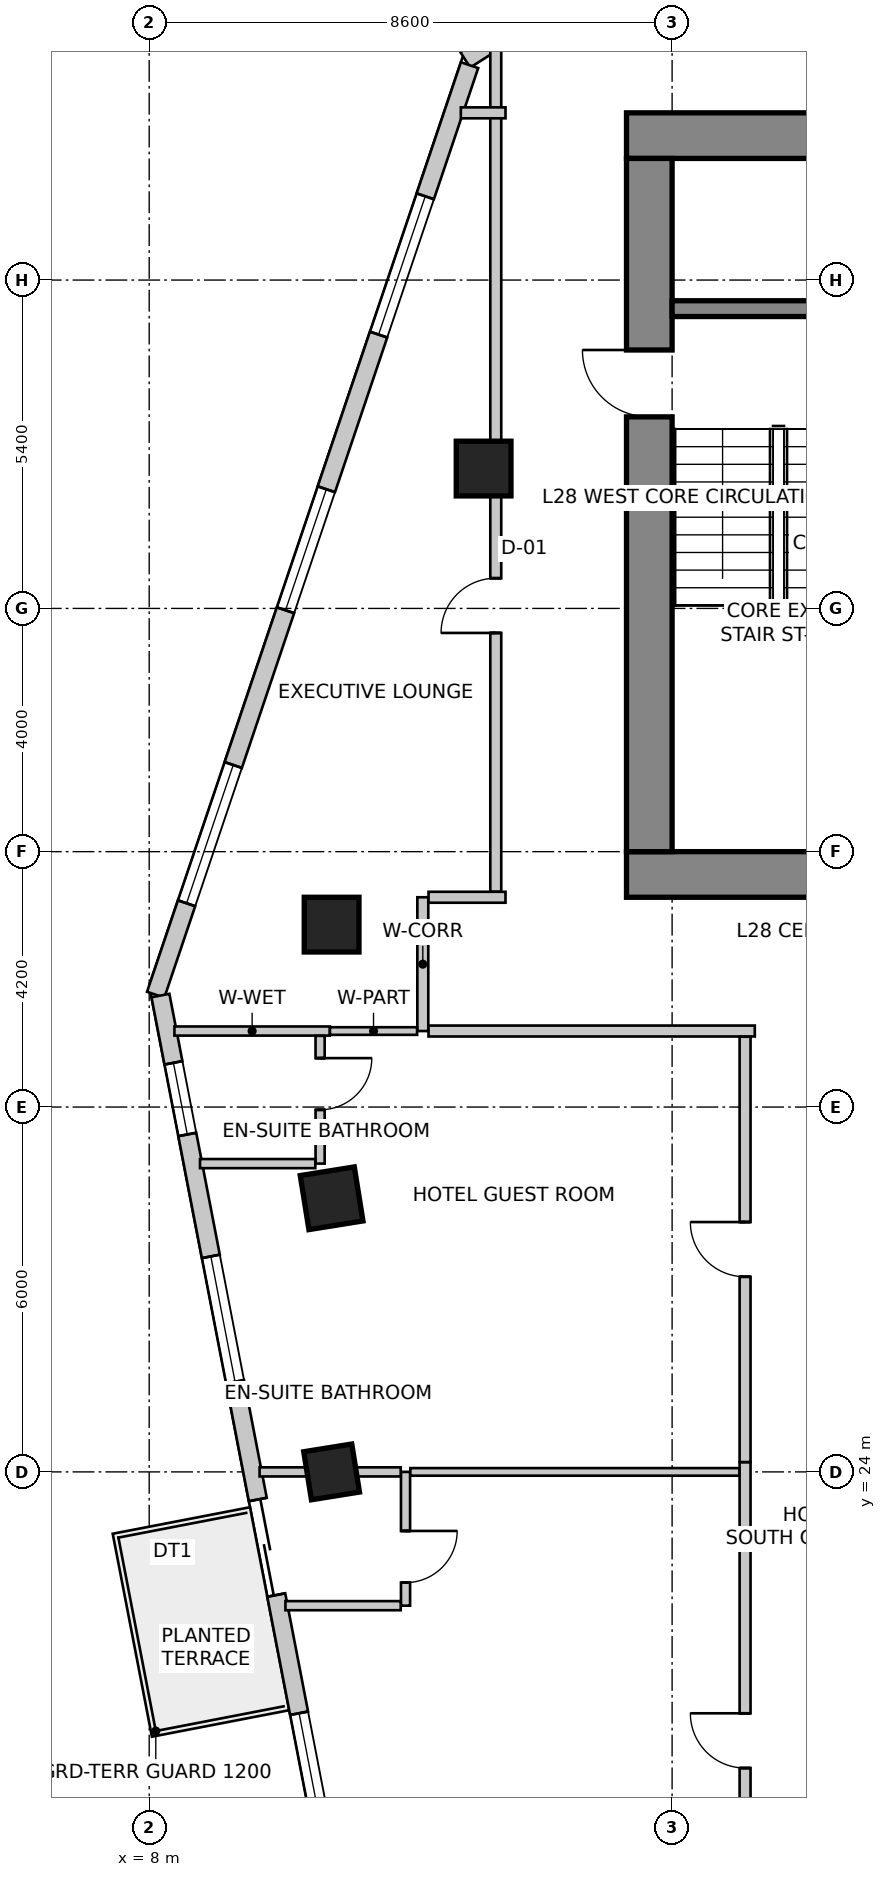
"""IFC4 building model, lengths in metres.
Left out: names, types, materials, properties, quantities, classifications, styles, units other than length and angle.
Written with IfcOpenShell. Run it as: python <this file> out.ifc"""

import sys

from ifc_helpers import new_model, si_unit, direction, frame, frame_2d, origin, origin_2d, place, context, subcontext, project, spatial, rectangle, extrude, source, transform, mapped, element, fill, save


model = new_model("IFC4")
c1 = context("Model", 3, precision=1e-05, world=origin(), true_north=direction((0.0, 1.0)))
c2 = subcontext(c1, "Body", "Model", "MODEL_VIEW")
j1 = project(units=[si_unit("LENGTHUNIT", "METRE"), si_unit("PLANEANGLEUNIT", "RADIAN")], contexts=[c1])
p1 = place(None, origin())
s1 = spatial("IfcSite", under=j1, at=p1, CompositionType="ELEMENT")
p2 = place(p1, origin())
s2 = spatial("IfcBuilding", under=s1, at=p2, CompositionType="ELEMENT")
p3 = place(p2, frame((0.0, 0.0, 117.8)))
s3 = spatial("IfcBuildingStorey", under=s2, at=p3, CompositionType="ELEMENT", Elevation=117.8)
p4 = place(p3, frame((15.85, 45.975, 0.0), z_axis=(0.0, 0.0, 1.0), x_axis=(1.0, 0.0, 0.0)))
e1 = element("IfcWall", 1, at=p4, inside=s3, PredefinedType="SHEAR", context=c2, shape_type="SweptSolid", body=[
    extrude(rectangle(XDim=15.9, YDim=0.75, at=frame_2d((7.95, 0.0))), origin(), (0.0, 0.0, 1.0), 3.6),
])
p5 = place(p3, frame((15.85, 33.825, 0.0), z_axis=(0.0, 0.0, 1.0), x_axis=(1.0, 0.0, 0.0)))
e2 = element("IfcWall", 2, at=p5, inside=s3, PredefinedType="SHEAR", context=c2, shape_type="SweptSolid", body=[
    extrude(rectangle(XDim=15.9, YDim=0.75, at=frame_2d((7.95, 0.0))), origin(), (0.0, 0.0, 1.0), 3.6),
])
m1 = source(origin(), c2, "Body", "SweptSolid", [
    extrude(rectangle(XDim=1.3, YDim=2.15, at=frame_2d((0.65, 1.075))), frame((0.0, 0.385, 0.0), z_axis=(0.0, -1.0, 0.0), x_axis=(1.0, 0.0, 0.0)), (0.0, 0.0, 1.0), 0.77),
])
p6 = place(p5, frame((10.08, 0.0, 0.0)))
e3 = element("IfcOpeningElement", 3, at=p6, cuts=e2, PredefinedType="OPENING", context=c2, shape_type="MappedRepresentation", body=[
    mapped(m1, transform((0.0, 0.0, 0.0), scale=1.0)),
])
p7 = place(p3, frame((16.225, 34.2, 0.0), z_axis=(0.0, 0.0, 1.0), x_axis=(0.0, 1.0, 0.0)))
e4 = element("IfcWall", 4, at=p7, inside=s3, PredefinedType="SHEAR", context=c2, shape_type="SweptSolid", body=[
    extrude(rectangle(XDim=11.4, YDim=0.75, at=frame_2d((5.7, 0.0))), origin(), (0.0, 0.0, 1.0), 3.6),
])
m2 = source(origin(), c2, "Body", "SweptSolid", [
    extrude(rectangle(XDim=1.1, YDim=2.15, at=frame_2d((0.55, 1.075))), frame((0.0, 0.385, 0.0), z_axis=(0.0, -1.0, 0.0), x_axis=(1.0, 0.0, 0.0)), (0.0, 0.0, 1.0), 0.77),
])
p8 = place(p7, frame((7.15, 0.0, 0.0)))
e5 = element("IfcOpeningElement", 5, at=p8, cuts=e4, PredefinedType="OPENING", context=c2, shape_type="MappedRepresentation", body=[
    mapped(m2, transform((0.0, 0.0, 0.0), scale=1.0)),
])
p9 = place(p3, frame((16.6, 43.13, 0.0), z_axis=(0.0, 0.0, 1.0), x_axis=(1.0, 0.0, 0.0)))
e6 = element("IfcWall", 6, at=p9, inside=s3, PredefinedType="SHEAR", context=c2, shape_type="SweptSolid", body=[
    extrude(rectangle(XDim=3.5, YDim=0.26, at=frame_2d((1.75, 0.0))), origin(), (0.0, 0.0, 1.0), 3.6),
])
m3 = source(origin(), c2, "Body", "SweptSolid", [
    extrude(rectangle(XDim=0.9, YDim=0.9, at=origin_2d()), origin(), (0.0, 0.0, 1.0), 3.6),
])
for number, where, z_axis, x_axis in (
    (7, (11.0, 33.0, 0.0), (0.0, 0.0, 1.0), (1.0, 0.0, 0.0)),
    (8, (13.5, 40.5, 0.0), (0.0, 0.0, 1.0), (1.0, 0.0, 0.0)),
    (9, (11.0, 28.5, 0.0), (0.0, 0.0, 1.0), (0.158, -0.987, 0.0)),
):
    element("IfcColumn", number, at=place(p3, frame(where, z_axis=z_axis, x_axis=x_axis)), inside=s3, PredefinedType="COLUMN", context=c2, shape_type="MappedRepresentation", body=[
        mapped(m3, transform((0.0, 0.0, 0.0), scale=1.0)),
    ])
m4 = source(origin(), c2, "Body", "SweptSolid", [
    extrude(rectangle(XDim=0.8, YDim=0.8, at=origin_2d()), origin(), (0.0, 0.0, 1.0), 3.6),
])
p10 = place(p3, frame((11.0, 24.0, 0.0), z_axis=(0.0, 0.0, 1.0), x_axis=(0.158158067254, -0.987413806751, 0.0)))
e10 = element("IfcColumn", 10, at=p10, inside=s3, PredefinedType="COLUMN", context=c2, shape_type="MappedRepresentation", body=[
    mapped(m4, transform((0.0, 0.0, 0.0), scale=1.0)),
])
p11 = place(p3, frame((21.875, 52.742, 0.0), z_axis=(0.0, 0.0, 1.0), x_axis=(-0.843662465249, -0.536873956092, 0.0)))
e11 = element("IfcWall", 11, at=p11, inside=s3, PredefinedType="SOLIDWALL", context=c2, shape_type="SweptSolid", body=[
    extrude(rectangle(XDim=10.284, YDim=0.3, at=frame_2d((5.142, 0.0))), origin(), (0.0, 0.0, 1.0), 3.35),
])
m5 = source(origin(), c2, "Body", "SweptSolid", [
    extrude(rectangle(XDim=2.1, YDim=2.0, at=frame_2d((1.05, 1.0))), frame((0.0, 0.16, 0.0), z_axis=(0.0, -1.0, 0.0), x_axis=(1.0, 0.0, 0.0)), (0.0, 0.0, 1.0), 0.32),
])
p12 = place(p11, frame((2.806, 0.0, 0.85)))
e12 = element("IfcOpeningElement", 12, at=p12, cuts=e11, PredefinedType="OPENING", context=c2, shape_type="MappedRepresentation", body=[
    mapped(m5, transform((0.0, 0.0, 0.0), scale=1.0)),
])
m6 = source(origin(), c2, "Body", "SweptSolid", [
    extrude(rectangle(XDim=1.2, YDim=1.6, at=frame_2d((0.6, 0.8))), frame((0.0, 0.16, 0.0), z_axis=(0.0, -1.0, 0.0), x_axis=(1.0, 0.0, 0.0)), (0.0, 0.0, 1.0), 0.32),
])
p13 = place(p11, frame((8.087, 0.0, 0.85)))
e13 = element("IfcOpeningElement", 13, at=p13, cuts=e11, PredefinedType="OPENING", context=c2, shape_type="MappedRepresentation", body=[
    mapped(m6, transform((0.0, 0.0, 0.0), scale=1.0)),
])
p14 = place(p3, frame((13.269, 47.134, 0.0), z_axis=(0.0, 0.0, 1.0), x_axis=(-0.319929596295, -0.947441319246, 0.0)))
e14 = element("IfcWall", 14, at=p14, inside=s3, PredefinedType="SOLIDWALL", context=c2, shape_type="SweptSolid", body=[
    extrude(rectangle(XDim=16.134, YDim=0.3, at=frame_2d((8.067, 0.0))), origin(), (0.0, 0.0, 1.0), 3.35),
])
m7 = source(origin(), c2, "Body", "SweptSolid", [
    extrude(rectangle(XDim=2.4, YDim=2.2, at=frame_2d((1.2, 1.1))), frame((0.0, 0.16, 0.0), z_axis=(0.0, -1.0, 0.0), x_axis=(1.0, 0.0, 0.0)), (0.0, 0.0, 1.0), 0.32),
])
p15 = place(p14, frame((2.276, 0.0, 0.85)))
e15 = element("IfcOpeningElement", 15, at=p15, cuts=e14, PredefinedType="OPENING", context=c2, shape_type="MappedRepresentation", body=[
    mapped(m7, transform((0.0, 0.0, 0.0), scale=1.0)),
])
p16 = place(p14, frame((7.361, 0.0, 0.85)))
e16 = element("IfcOpeningElement", 16, at=p16, cuts=e14, PredefinedType="OPENING", context=c2, shape_type="MappedRepresentation", body=[
    mapped(m5, transform((0.0, 0.0, 0.0), scale=1.0)),
])
p17 = place(p14, frame((12.147, 0.0, 0.85)))
e17 = element("IfcOpeningElement", 17, at=p17, cuts=e14, PredefinedType="OPENING", context=c2, shape_type="MappedRepresentation", body=[
    mapped(m7, transform((0.0, 0.0, 0.0), scale=1.0)),
])
p18 = place(p3, frame((8.185, 31.834, 0.0), z_axis=(0.0, 0.0, 1.0), x_axis=(0.189707113148, -0.981840725994, 0.0)))
e18 = element("IfcWall", 18, at=p18, inside=s3, PredefinedType="SOLIDWALL", context=c2, shape_type="SweptSolid", body=[
    extrude(rectangle(XDim=21.221, YDim=0.3, at=frame_2d((10.611, 0.0))), origin(), (0.0, 0.0, 1.0), 3.35),
])
m8 = source(origin(), c2, "Body", "SweptSolid", [
    extrude(rectangle(XDim=1.6, YDim=2.15, at=frame_2d((0.8, 1.075))), frame((0.0, 0.16, 0.0), z_axis=(0.0, -1.0, 0.0), x_axis=(1.0, 0.0, 0.0)), (0.0, 0.0, 1.0), 0.32),
])
p19 = place(p18, frame((8.441, 0.0, 0.0)))
e19 = element("IfcOpeningElement", 19, at=p19, cuts=e18, PredefinedType="OPENING", context=c2, shape_type="MappedRepresentation", body=[
    mapped(m8, transform((0.0, 0.0, 0.0), scale=1.0)),
])
p20 = place(p18, frame((1.127, 0.0, 0.85)))
e20 = element("IfcOpeningElement", 20, at=p20, cuts=e18, PredefinedType="OPENING", context=c2, shape_type="MappedRepresentation", body=[
    mapped(m6, transform((0.0, 0.0, 0.0), scale=1.0)),
])
p21 = place(p18, frame((4.369, 0.0, 0.85)))
e21 = element("IfcOpeningElement", 21, at=p21, cuts=e18, PredefinedType="OPENING", context=c2, shape_type="MappedRepresentation", body=[
    mapped(m5, transform((0.0, 0.0, 0.0), scale=1.0)),
])
p22 = place(p18, frame((12.021, 0.0, 0.85)))
e22 = element("IfcOpeningElement", 22, at=p22, cuts=e18, PredefinedType="OPENING", context=c2, shape_type="MappedRepresentation", body=[
    mapped(m5, transform((0.0, 0.0, 0.0), scale=1.0)),
])
p23 = place(p18, frame((17.091, 0.0, 0.85)))
e23 = element("IfcOpeningElement", 23, at=p23, cuts=e18, PredefinedType="OPENING", context=c2, shape_type="MappedRepresentation", body=[
    mapped(m7, transform((0.0, 0.0, 0.0), scale=1.0)),
])
p24 = place(p3, frame((12.5, 31.25, 0.0), z_axis=(0.0, 0.0, 1.0), x_axis=(0.0, 1.0, 0.0)))
e24 = element("IfcWall", 24, at=p24, inside=s3, PredefinedType="PARTITIONING", context=c2, shape_type="SweptSolid", body=[
    extrude(rectangle(XDim=2.2, YDim=0.18, at=frame_2d((1.1, 0.0))), origin(), (0.0, 0.0, 1.0), 3.019),
])
p25 = place(p3, frame((12.594, 33.45, 0.0), z_axis=(0.0, 0.0, 1.0), x_axis=(1.0, 0.0, 0.0)))
e25 = element("IfcWall", 25, at=p25, inside=s3, PredefinedType="PARTITIONING", context=c2, shape_type="SweptSolid", body=[
    extrude(rectangle(XDim=1.266, YDim=0.18, at=frame_2d((0.633, 0.0))), origin(), (0.0, 0.0, 1.0), 3.35),
])
p26 = place(p3, frame((17.96, 31.25, 0.0), z_axis=(0.0, 0.0, 1.0), x_axis=(-1.0, 0.0, 0.0)))
e26 = element("IfcWall", 26, at=p26, inside=s3, PredefinedType="PARTITIONING", context=c2, shape_type="SweptSolid", body=[
    extrude(rectangle(XDim=5.366, YDim=0.18, at=frame_2d((2.683, 0.0))), origin(), (0.0, 0.0, 1.0), 3.019),
])
p27 = place(p3, frame((13.7, 33.544, 0.0), z_axis=(0.0, 0.0, 1.0), x_axis=(0.0, 1.0, 0.0)))
e27 = element("IfcWall", 27, at=p27, inside=s3, PredefinedType="PARTITIONING", context=c2, shape_type="SweptSolid", body=[
    extrude(rectangle(XDim=13.86, YDim=0.18, at=frame_2d((6.93, 0.0))), origin(), (0.0, 0.0, 1.0), 2.492),
])
m9 = source(origin(), c2, "Body", "SweptSolid", [
    extrude(rectangle(XDim=0.9, YDim=2.15, at=frame_2d((0.45, 1.075))), frame((0.0, 0.1, 0.0), z_axis=(0.0, -1.0, 0.0), x_axis=(1.0, 0.0, 0.0)), (0.0, 0.0, 1.0), 0.2),
])
p28 = place(p27, frame((4.253, 0.0, 0.0)))
e28 = element("IfcOpeningElement", 28, at=p28, cuts=e27, PredefinedType="OPENING", context=c2, shape_type="MappedRepresentation", body=[
    mapped(m9, transform((0.0, 0.0, 0.0), scale=1.0)),
])
p29 = place(p3, frame((13.86, 46.35, 0.0), z_axis=(0.0, 0.0, 1.0), x_axis=(-1.0, 0.0, 0.0)))
e29 = element("IfcWall", 29, at=p29, inside=s3, PredefinedType="PARTITIONING", context=c2, shape_type="SweptSolid", body=[
    extrude(rectangle(XDim=0.735, YDim=0.18, at=frame_2d((0.367, 0.0))), origin(), (0.0, 0.0, 1.0), 3.35),
])
p30 = place(p3, frame((10.971, 31.25, 0.0), z_axis=(0.0, 0.0, 1.0), x_axis=(-1.0, 0.0, 0.0)))
e30 = element("IfcWall", 30, at=p30, inside=s3, PredefinedType="PARTITIONING", context=c2, shape_type="SweptSolid", body=[
    extrude(rectangle(XDim=2.556, YDim=0.15, at=frame_2d((1.278, 0.0))), origin(), (0.0, 0.0, 1.0), 2.492),
])
p31 = place(p3, frame((12.406, 31.25, 0.0), z_axis=(0.0, 0.0, 1.0), x_axis=(-1.0, 0.0, 0.0)))
e31 = element("IfcWall", 31, at=p31, inside=s3, PredefinedType="PARTITIONING", context=c2, shape_type="SweptSolid", body=[
    extrude(rectangle(XDim=1.433, YDim=0.125, at=frame_2d((0.717, 0.0))), origin(), (0.0, 0.0, 1.0), 2.492),
])
p32 = place(p3, frame((17.8, 15.0, 0.0), z_axis=(0.0, 0.0, 1.0), x_axis=(0.0, 1.0, 0.0)))
e32 = element("IfcWall", 32, at=p32, inside=s3, PredefinedType="PARTITIONING", context=c2, shape_type="SweptSolid", body=[
    extrude(rectangle(XDim=9.16, YDim=0.18, at=frame_2d((4.58, 0.0))), origin(), (0.0, 0.0, 1.0), 2.492),
])
p33 = place(p32, frame((4.13, 0.0, 0.0)))
e33 = element("IfcOpeningElement", 33, at=p33, cuts=e32, PredefinedType="OPENING", context=c2, shape_type="MappedRepresentation", body=[
    mapped(m9, transform((0.0, 0.0, 0.0), scale=1.0)),
])
p34 = place(p3, frame((17.8, 24.162, 0.0), z_axis=(0.0, 0.0, 1.0), x_axis=(0.0, 1.0, 0.0)))
e34 = element("IfcWall", 34, at=p34, inside=s3, PredefinedType="PARTITIONING", context=c2, shape_type="SweptSolid", body=[
    extrude(rectangle(XDim=6.994, YDim=0.18, at=frame_2d((3.497, 0.0))), origin(), (0.0, 0.0, 1.0), 2.803),
])
p35 = place(p34, frame((3.047, 0.0, 0.0)))
e35 = element("IfcOpeningElement", 35, at=p35, cuts=e34, PredefinedType="OPENING", context=c2, shape_type="MappedRepresentation", body=[
    mapped(m9, transform((0.0, 0.0, 0.0), scale=1.0)),
])
p36 = place(p3, frame((12.216, 24.0, 0.0), z_axis=(0.0, 0.0, 1.0), x_axis=(0.0, -1.0, 0.0)))
e36 = element("IfcWall", 36, at=p36, inside=s3, PredefinedType="PARTITIONING", context=c2, shape_type="SweptSolid", body=[
    extrude(rectangle(XDim=2.2, YDim=0.15, at=frame_2d((1.1, 0.0))), origin(), (0.0, 0.0, 1.0), 2.803),
])
m10 = source(origin(), c2, "Body", "SweptSolid", [
    extrude(rectangle(XDim=0.85, YDim=2.15, at=frame_2d((0.425, 1.075))), frame((0.0, 0.085, 0.0), z_axis=(0.0, -1.0, 0.0), x_axis=(1.0, 0.0, 0.0)), (0.0, 0.0, 1.0), 0.17),
])
p37 = place(p36, frame((0.971, 0.0, 0.0)))
e37 = element("IfcOpeningElement", 37, at=p37, cuts=e36, PredefinedType="OPENING", context=c2, shape_type="MappedRepresentation", body=[
    mapped(m10, transform((0.0, 0.0, 0.0), scale=1.0)),
])
p38 = place(p3, frame((12.137, 21.8, 0.0), z_axis=(0.0, 0.0, 1.0), x_axis=(-1.0, 0.0, 0.0)))
e38 = element("IfcWall", 38, at=p38, inside=s3, PredefinedType="PARTITIONING", context=c2, shape_type="SweptSolid", body=[
    extrude(rectangle(XDim=1.896, YDim=0.15, at=frame_2d((0.948, 0.0))), origin(), (0.0, 0.0, 1.0), 3.35),
])
p39 = place(p3, frame((9.816, 24.0, 0.0), z_axis=(0.0, 0.0, 1.0), x_axis=(1.0, 0.0, 0.0)))
e39 = element("IfcWall", 39, at=p39, inside=s3, PredefinedType="PARTITIONING", context=c2, shape_type="SweptSolid", body=[
    extrude(rectangle(XDim=2.321, YDim=0.15, at=frame_2d((1.161, 0.0))), origin(), (0.0, 0.0, 1.0), 2.492),
])
p40 = place(p3, frame((12.295, 24.0, 0.0), z_axis=(0.0, 0.0, 1.0), x_axis=(1.0, 0.0, 0.0)))
e40 = element("IfcWall", 40, at=p40, inside=s3, PredefinedType="PARTITIONING", context=c2, shape_type="SweptSolid", body=[
    extrude(rectangle(XDim=5.411, YDim=0.125, at=frame_2d((2.706, 0.0))), origin(), (0.0, 0.0, 1.0), 2.803),
])
p41 = place(p3, frame((10.811, 31.171, 0.0), z_axis=(0.0, 0.0, 1.0), x_axis=(0.0, -1.0, 0.0)))
e41 = element("IfcWall", 41, at=p41, inside=s3, PredefinedType="PARTITIONING", context=c2, shape_type="SweptSolid", body=[
    extrude(rectangle(XDim=2.101, YDim=0.15, at=frame_2d((1.05, 0.0))), origin(), (0.0, 0.0, 1.0), 2.492),
])
p42 = place(p41, frame((0.366, 0.0, 0.0)))
e42 = element("IfcOpeningElement", 42, at=p42, cuts=e41, PredefinedType="OPENING", context=c2, shape_type="MappedRepresentation", body=[
    mapped(m10, transform((0.0, 0.0, 0.0), scale=1.0)),
])
p43 = place(p3, frame((10.732, 29.07, 0.0), z_axis=(0.0, 0.0, 1.0), x_axis=(-1.0, 0.0, 0.0)))
e43 = element("IfcWall", 43, at=p43, inside=s3, PredefinedType="PARTITIONING", context=c2, shape_type="SweptSolid", body=[
    extrude(rectangle(XDim=1.896, YDim=0.15, at=frame_2d((0.948, 0.0))), origin(), (0.0, 0.0, 1.0), 3.35),
])
m11 = source(origin(), c2, "Body", "SweptSolid", [
    extrude(rectangle(XDim=2.4, YDim=2.2, at=frame_2d((1.2, 1.1))), frame((0.0, -0.015, 0.0), z_axis=(0.0, -1.0, 0.0), x_axis=(1.0, 0.0, 0.0)), (0.0, 0.0, 1.0), 0.06),
])
p44 = place(p15, origin())
e44 = element("IfcWindow", 44, at=p44, inside=s3, PartitioningType="SINGLE_PANEL", PredefinedType="WINDOW", context=c2, shape_type="MappedRepresentation", body=[
    mapped(m11, transform((0.0, 0.0, 0.0), scale=1.0)),
])
fill(e15, e44)
m12 = source(origin(), c2, "Body", "SweptSolid", [
    extrude(rectangle(XDim=2.1, YDim=2.0, at=frame_2d((1.05, 1.0))), frame((0.0, -0.015, 0.0), z_axis=(0.0, -1.0, 0.0), x_axis=(1.0, 0.0, 0.0)), (0.0, 0.0, 1.0), 0.06),
])
p45 = place(p16, origin())
e45 = element("IfcWindow", 45, at=p45, inside=s3, PartitioningType="SINGLE_PANEL", PredefinedType="WINDOW", context=c2, shape_type="MappedRepresentation", body=[
    mapped(m12, transform((0.0, 0.0, 0.0), scale=1.0)),
])
fill(e16, e45)
p46 = place(p17, origin())
e46 = element("IfcWindow", 46, at=p46, inside=s3, PartitioningType="SINGLE_PANEL", PredefinedType="WINDOW", context=c2, shape_type="MappedRepresentation", body=[
    mapped(m11, transform((0.0, 0.0, 0.0), scale=1.0)),
])
fill(e17, e46)
m13 = source(origin(), c2, "Body", "SweptSolid", [
    extrude(rectangle(XDim=1.6, YDim=2.15, at=frame_2d((0.8, 1.075))), frame((0.0, 0.025, 0.0), z_axis=(0.0, -1.0, 0.0), x_axis=(1.0, 0.0, 0.0)), (0.0, 0.0, 1.0), 0.05),
])
p47 = place(p19, origin())
e47 = element("IfcDoor", 47, at=p47, inside=s3, OperationType="DOUBLE_DOOR_SLIDING", PredefinedType="DOOR", context=c2, shape_type="MappedRepresentation", body=[
    mapped(m13, transform((0.0, 0.0, 0.0), scale=1.0)),
])
fill(e19, e47)
m14 = source(origin(), c2, "Body", "SweptSolid", [
    extrude(rectangle(XDim=1.2, YDim=1.6, at=frame_2d((0.6, 0.8))), frame((0.0, -0.015, 0.0), z_axis=(0.0, -1.0, 0.0), x_axis=(1.0, 0.0, 0.0)), (0.0, 0.0, 1.0), 0.06),
])
p48 = place(p20, origin())
e48 = element("IfcWindow", 48, at=p48, inside=s3, PartitioningType="SINGLE_PANEL", PredefinedType="WINDOW", context=c2, shape_type="MappedRepresentation", body=[
    mapped(m14, transform((0.0, 0.0, 0.0), scale=1.0)),
])
fill(e20, e48)
p49 = place(p21, origin())
e49 = element("IfcWindow", 49, at=p49, inside=s3, PartitioningType="SINGLE_PANEL", PredefinedType="WINDOW", context=c2, shape_type="MappedRepresentation", body=[
    mapped(m12, transform((0.0, 0.0, 0.0), scale=1.0)),
])
fill(e21, e49)
p50 = place(p22, origin())
e50 = element("IfcWindow", 50, at=p50, inside=s3, PartitioningType="SINGLE_PANEL", PredefinedType="WINDOW", context=c2, shape_type="MappedRepresentation", body=[
    mapped(m12, transform((0.0, 0.0, 0.0), scale=1.0)),
])
fill(e22, e50)
m15 = source(origin(), c2, "Body", "SweptSolid", [
    extrude(rectangle(XDim=1.1, YDim=2.15, at=frame_2d((0.55, 1.075))), frame((0.0, 0.025, 0.0), z_axis=(0.0, -1.0, 0.0), x_axis=(1.0, 0.0, 0.0)), (0.0, 0.0, 1.0), 0.05),
])
p51 = place(p8, origin())
e51 = element("IfcDoor", 51, at=p51, inside=s3, OperationType="SINGLE_SWING_RIGHT", PredefinedType="DOOR", context=c2, shape_type="MappedRepresentation", body=[
    mapped(m15, transform((0.0, 0.0, 0.0), scale=1.0)),
])
fill(e5, e51)
m16 = source(origin(), c2, "Body", "SweptSolid", [
    extrude(rectangle(XDim=0.9, YDim=2.15, at=frame_2d((0.45, 1.075))), frame((0.0, 0.025, 0.0), z_axis=(0.0, -1.0, 0.0), x_axis=(1.0, 0.0, 0.0)), (0.0, 0.0, 1.0), 0.05),
])
p52 = place(p28, origin())
e52 = element("IfcDoor", 52, at=p52, inside=s3, OperationType="SINGLE_SWING_LEFT", PredefinedType="DOOR", context=c2, shape_type="MappedRepresentation", body=[
    mapped(m16, transform((0.0, 0.0, 0.0), scale=1.0)),
])
fill(e28, e52)
m17 = source(origin(), c2, "Body", "SweptSolid", [
    extrude(rectangle(XDim=0.85, YDim=2.15, at=frame_2d((0.425, 1.075))), frame((0.0, 0.025, 0.0), z_axis=(0.0, -1.0, 0.0), x_axis=(1.0, 0.0, 0.0)), (0.0, 0.0, 1.0), 0.05),
])
p53 = place(p37, origin())
e53 = element("IfcDoor", 53, at=p53, inside=s3, OperationType="SINGLE_SWING_LEFT", PredefinedType="DOOR", context=c2, shape_type="MappedRepresentation", body=[
    mapped(m17, transform((0.0, 0.0, 0.0), scale=1.0)),
])
fill(e37, e53)
m18 = source(origin(), c2, "Body", "SweptSolid", [
    extrude(rectangle(XDim=0.9, YDim=2.15, at=frame_2d((0.45, 1.075))), frame((0.0, 0.025, 0.0), z_axis=(0.0, -1.0, 0.0), x_axis=(1.0, 0.0, 0.0)), (0.0, 0.0, 1.0), 0.05),
])
p54 = place(p33, origin())
e54 = element("IfcDoor", 54, at=p54, inside=s3, OperationType="SINGLE_SWING_RIGHT", PredefinedType="DOOR", context=c2, shape_type="MappedRepresentation", body=[
    mapped(m18, transform((0.0, 0.0, 0.0), scale=1.0)),
])
fill(e33, e54)
p55 = place(p42, origin())
e55 = element("IfcDoor", 55, at=p55, inside=s3, OperationType="SINGLE_SWING_LEFT", PredefinedType="DOOR", context=c2, shape_type="MappedRepresentation", body=[
    mapped(m17, transform((0.0, 0.0, 0.0), scale=1.0)),
])
fill(e42, e55)
p56 = place(p35, origin())
e56 = element("IfcDoor", 56, at=p56, inside=s3, OperationType="SINGLE_SWING_RIGHT", PredefinedType="DOOR", context=c2, shape_type="MappedRepresentation", body=[
    mapped(m18, transform((0.0, 0.0, 0.0), scale=1.0)),
])
fill(e35, e56)
save(model, sys.argv[1])
